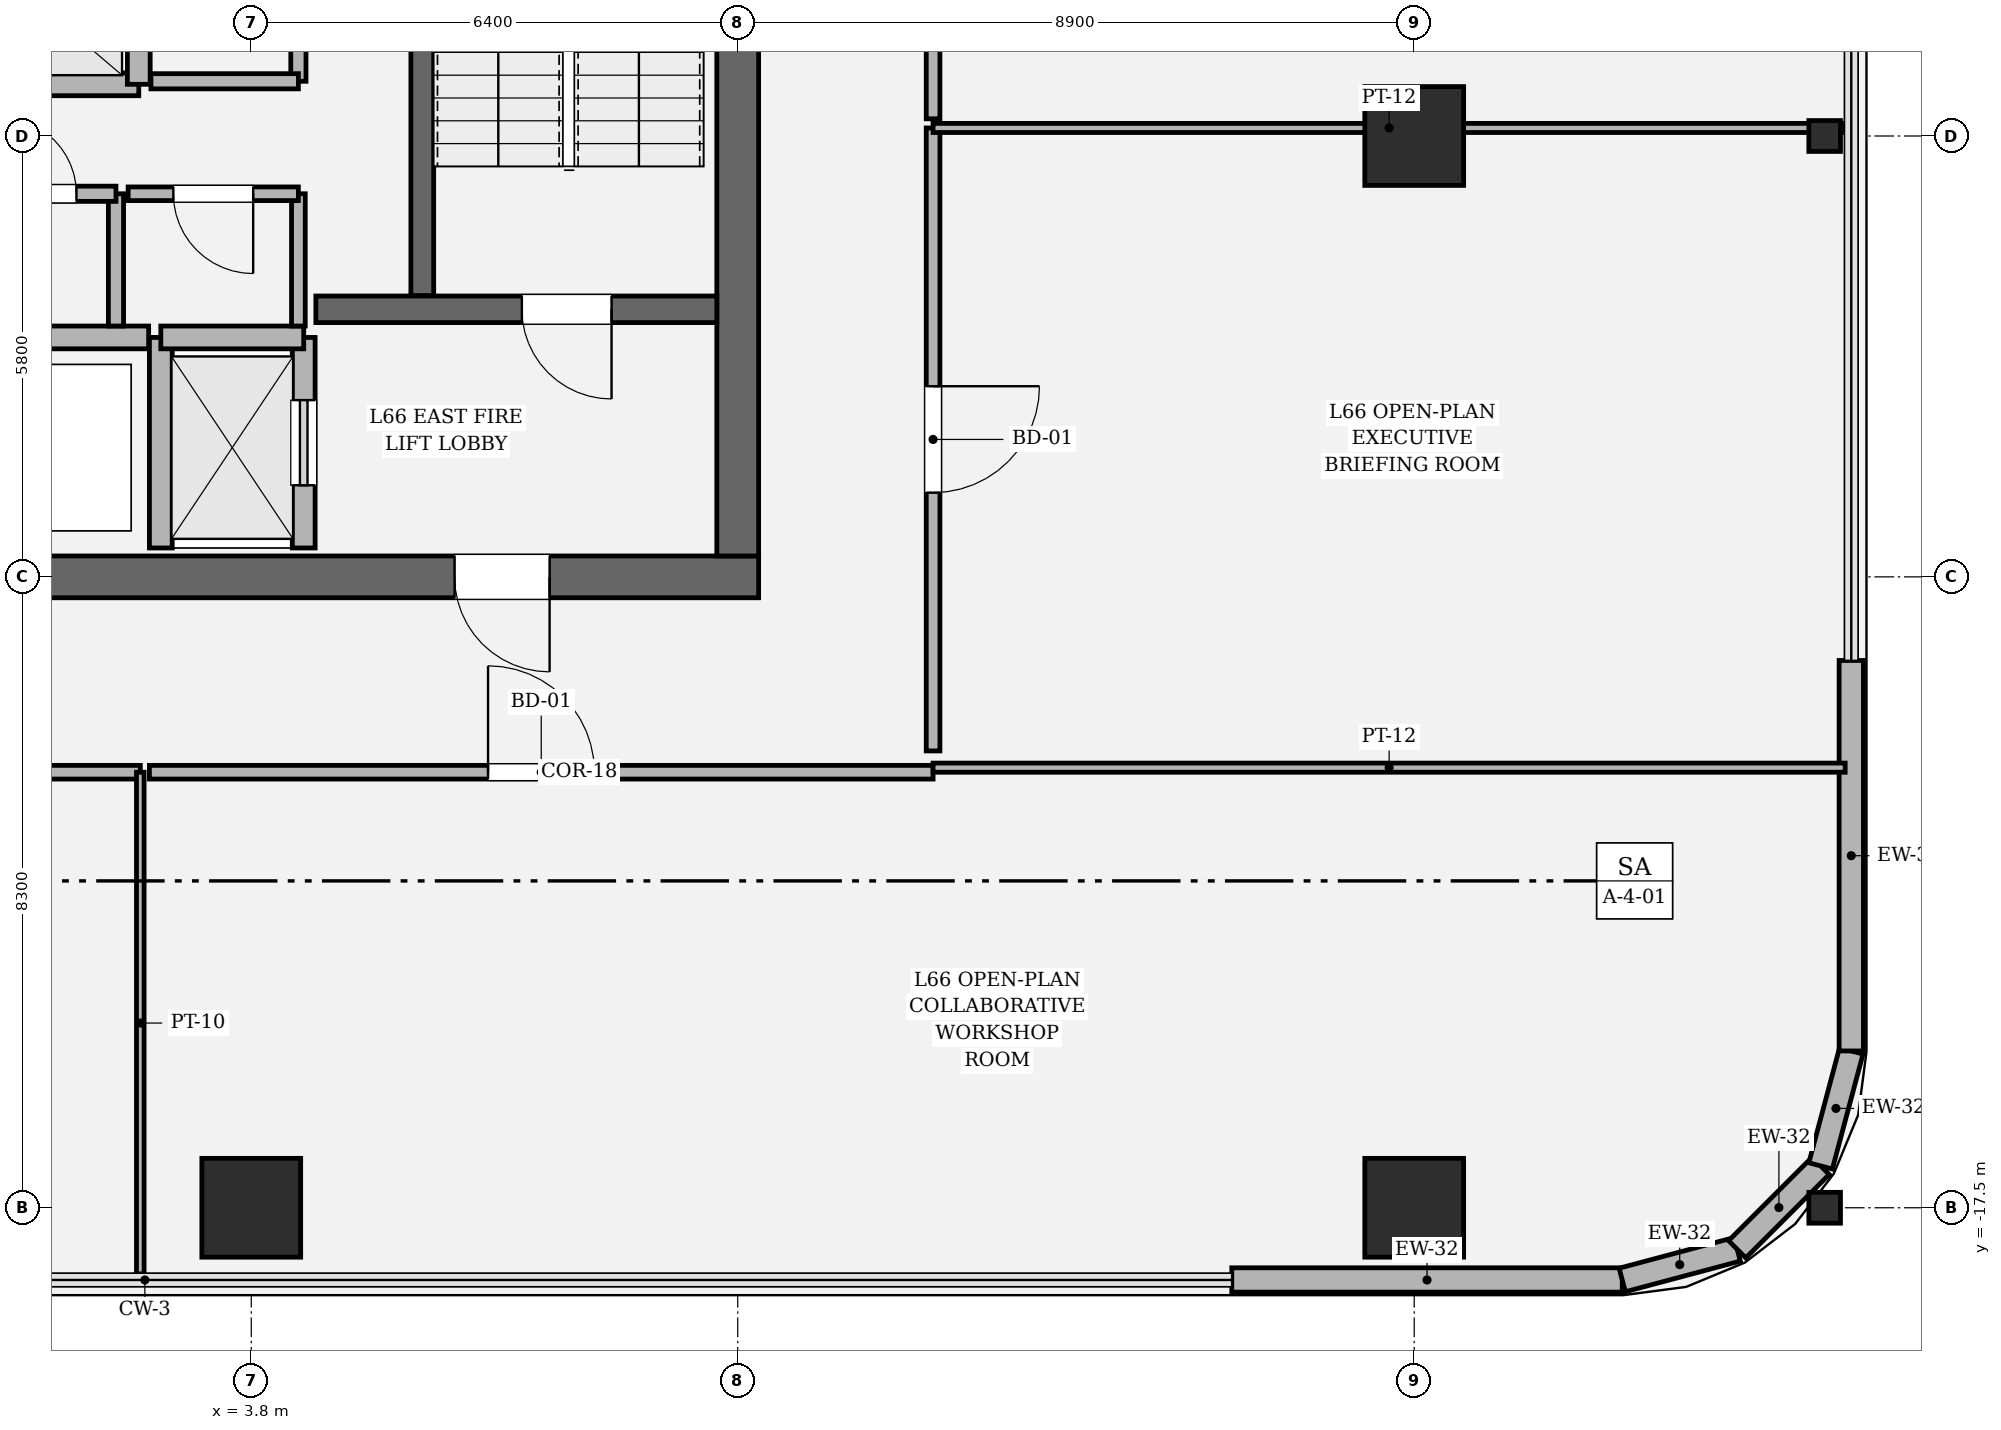
"""IFC4 building model, lengths in metres.
Left out: names, types, materials, properties, quantities, classifications, styles, units other than length and angle.
Written with IfcOpenShell. Run it as: python <this file> out.ifc"""

import sys

from ifc_helpers import new_model, si_unit, direction, frame, frame_2d, origin, origin_2d, place, context, subcontext, project, spatial, rectangle, hollow_rectangle, i_section, extrude, element, fill, save


model = new_model("IFC4")
c1 = context("Model", 3, precision=1e-05, world=origin(), true_north=direction((0.0, 1.0)))
c2 = subcontext(c1, "Body", "Model", "MODEL_VIEW")
j1 = project(units=[si_unit("LENGTHUNIT", "METRE"), si_unit("PLANEANGLEUNIT", "RADIAN")], contexts=[c1])
p1 = place(None, origin())
s1 = spatial("IfcSite", under=j1, at=p1, CompositionType="ELEMENT")
p2 = place(p1, origin())
s2 = spatial("IfcBuilding", under=s1, at=p2, CompositionType="ELEMENT")
p3 = place(p2, frame((0.0, 0.0, 279.75)))
s3 = spatial("IfcBuildingStorey", under=s2, at=p3, CompositionType="ELEMENT", Elevation=279.75)
p4 = place(p3, frame((10.475, -9.2, 0.0), z_axis=(0.0, 0.0, 1.0), x_axis=(-1.0, 0.0, 0.0)))
e1 = element("IfcWall", 1, at=p4, inside=s3, PredefinedType="SHEAR", context=c2, shape_type="SweptSolid", body=[
    extrude(rectangle(XDim=20.95, YDim=0.55, at=frame_2d((10.475, 0.0))), origin(), (0.0, 0.0, 1.0), 4.05),
])
p5 = place(p4, frame((2.75, 0.0, 0.0)))
e2 = element("IfcOpeningElement", 2, at=p5, cuts=e1, PredefinedType="OPENING", context=c2, shape_type="SweptSolid", body=[
    extrude(rectangle(XDim=1.25, YDim=2.25, at=frame_2d((0.625, 1.125))), frame((0.0, 0.285, 0.0), z_axis=(0.0, -1.0, 0.0), x_axis=(1.0, 0.0, 0.0)), (0.0, 0.0, 1.0), 0.57),
])
p6 = place(p4, frame((16.95, 0.0, 0.0)))
e3 = element("IfcOpeningElement", 3, at=p6, cuts=e1, PredefinedType="OPENING", context=c2, shape_type="SweptSolid", body=[
    extrude(rectangle(XDim=1.25, YDim=2.25, at=frame_2d((0.625, 1.125))), frame((0.0, 0.285, 0.0), z_axis=(0.0, -1.0, 0.0), x_axis=(1.0, 0.0, 0.0)), (0.0, 0.0, 1.0), 0.57),
])
p7 = place(p3, frame((10.2, 8.925, 0.0), z_axis=(0.0, 0.0, 1.0), x_axis=(0.0, -1.0, 0.0)))
e4 = element("IfcWall", 4, at=p7, inside=s3, PredefinedType="SHEAR", context=c2, shape_type="SweptSolid", body=[
    extrude(rectangle(XDim=17.85, YDim=0.55, at=frame_2d((8.925, 0.0))), origin(), (0.0, 0.0, 1.0), 4.05),
])
p8 = place(p7, frame((3.955, 0.0, 0.0)))
e5 = element("IfcOpeningElement", 5, at=p8, cuts=e4, PredefinedType="OPENING", context=c2, shape_type="SweptSolid", body=[
    extrude(rectangle(XDim=1.18, YDim=2.2, at=frame_2d((0.59, 1.1))), frame((0.0, 0.285, 0.0), z_axis=(0.0, -1.0, 0.0), x_axis=(1.0, 0.0, 0.0)), (0.0, 0.0, 1.0), 0.57),
])
p9 = place(p3, frame((6.05, 3.45, 0.0), z_axis=(0.0, 0.0, 1.0), x_axis=(0.0, -1.0, 0.0)))
e6 = element("IfcWall", 6, at=p9, inside=s3, PredefinedType="SOLIDWALL", context=c2, shape_type="SweptSolid", body=[
    extrude(rectangle(XDim=8.95, YDim=0.3, at=frame_2d((4.475, 0.0))), origin(), (0.0, 0.0, 1.0), 4.05),
])
p10 = place(p3, frame((4.65, -5.68, 0.0), z_axis=(0.0, 0.0, 1.0), x_axis=(1.0, 0.0, 0.0)))
e7 = element("IfcWall", 7, at=p10, inside=s3, PredefinedType="SOLIDWALL", context=c2, shape_type="SweptSolid", body=[
    extrude(rectangle(XDim=5.275, YDim=0.35, at=frame_2d((2.638, 0.0))), origin(), (0.0, 0.0, 1.0), 4.05),
])
p11 = place(p10, frame((2.71, 0.0, 0.0)))
e8 = element("IfcOpeningElement", 8, at=p11, cuts=e7, PredefinedType="OPENING", context=c2, shape_type="SweptSolid", body=[
    extrude(rectangle(XDim=1.18, YDim=2.2, at=frame_2d((0.59, 1.1))), frame((0.0, 0.185, 0.0), z_axis=(0.0, -1.0, 0.0), x_axis=(1.0, 0.0, 0.0)), (0.0, 0.0, 1.0), 0.37),
])
for number, where, z_axis, x_axis in (
    (9, (3.8, -17.5, 0.0), (0.0, 0.0, 1.0), (1.0, 0.0, 0.0)),
    (10, (19.1, -17.5, 0.0), (0.0, 0.0, 1.0), (1.0, 0.0, 0.0)),
    (11, (19.1, -3.4, 0.0), (0.0, 0.0, 1.0), (1.0, 0.0, 0.0)),
):
    element("IfcColumn", number, at=place(p3, frame(where, z_axis=z_axis, x_axis=x_axis)), inside=s3, PredefinedType="COLUMN", context=c2, shape_type="SweptSolid", body=[
        extrude(hollow_rectangle(XDim=1.3, YDim=1.3, WallThickness=0.038, at=origin_2d()), origin(), (0.0, 0.0, 1.0), 4.05),
    ])
for number, where, z_axis, x_axis in (
    (12, (24.5, -17.5, 0.0), (0.0, 0.0, 1.0), (0.0, 1.0, 0.0)),
    (13, (24.5, -3.4, 0.0), (0.0, 0.0, 1.0), (0.0, 1.0, 0.0)),
):
    element("IfcColumn", number, at=place(p3, frame(where, z_axis=z_axis, x_axis=x_axis)), inside=s3, PredefinedType="COLUMN", context=c2, shape_type="SweptSolid", body=[
        extrude(i_section(OverallWidth=0.406, OverallDepth=0.416, WebThickness=0.029, FlangeThickness=0.048, FilletRadius=0.018, at=origin_2d()), origin(), (0.0, 0.0, 1.0), 4.048),
    ])
p12 = place(p3, frame((16.7, -18.45, 0.0), z_axis=(0.0, 0.0, 1.0), x_axis=(1.0, 0.0, 0.0)))
e14 = element("IfcWall", 14, at=p12, inside=s3, PredefinedType="SOLIDWALL", context=c2, shape_type="SweptSolid", body=[
    extrude(rectangle(XDim=5.137, YDim=0.32, at=frame_2d((2.568, 0.0))), origin(), (0.0, 0.0, 1.0), 3.77),
])
p13 = place(p3, frame((21.837, -18.45, 0.0), z_axis=(0.0, 0.0, 1.0), x_axis=(0.966224582397, 0.257701486942, 0.0)))
e15 = element("IfcWall", 15, at=p13, inside=s3, PredefinedType="SOLIDWALL", context=c2, shape_type="SweptSolid", body=[
    extrude(rectangle(XDim=1.565, YDim=0.32, at=frame_2d((0.783, 0.0))), origin(), (0.0, 0.0, 1.0), 3.77),
])
p14 = place(p3, frame((23.349, -18.047, 0.0), z_axis=(0.0, 0.0, 1.0), x_axis=(0.707106781187, 0.707106781187, 0.0)))
e16 = element("IfcWall", 16, at=p14, inside=s3, PredefinedType="SOLIDWALL", context=c2, shape_type="SweptSolid", body=[
    extrude(rectangle(XDim=1.552, YDim=0.32, at=frame_2d((0.776, 0.0))), origin(), (0.0, 0.0, 1.0), 3.77),
])
p15 = place(p3, frame((24.447, -16.949, 0.0), z_axis=(0.0, 0.0, 1.0), x_axis=(0.257847112249, 0.966185730957, 0.0)))
e17 = element("IfcWall", 17, at=p15, inside=s3, PredefinedType="SOLIDWALL", context=c2, shape_type="SweptSolid", body=[
    extrude(rectangle(XDim=1.565, YDim=0.32, at=frame_2d((0.783, 0.0))), origin(), (0.0, 0.0, 1.0), 3.77),
])
p16 = place(p3, frame((24.85, -15.437, 0.0), z_axis=(0.0, 0.0, 1.0), x_axis=(0.0, 1.0, 0.0)))
e18 = element("IfcWall", 18, at=p16, inside=s3, PredefinedType="SOLIDWALL", context=c2, shape_type="SweptSolid", body=[
    extrude(rectangle(XDim=5.137, YDim=0.32, at=frame_2d((2.568, 0.0))), origin(), (0.0, 0.0, 1.0), 3.77),
])
p17 = place(p3, frame((4.49, -8.82, 0.0), z_axis=(0.0, 0.0, 1.0), x_axis=(0.0, 1.0, 0.0)))
e19 = element("IfcWall", 19, at=p17, inside=s3, PredefinedType="SOLIDWALL", context=c2, shape_type="SweptSolid", body=[
    extrude(rectangle(XDim=2.77, YDim=0.3, at=frame_2d((1.385, 0.0))), origin(), (0.0, 0.0, 1.0), 3.77),
])
p18 = place(p17, frame((0.825, 0.0, 0.0)))
e20 = element("IfcOpeningElement", 20, at=p18, cuts=e19, PredefinedType="OPENING", context=c2, shape_type="SweptSolid", body=[
    extrude(rectangle(XDim=1.12, YDim=2.25, at=frame_2d((0.56, 1.125))), frame((0.0, 0.16, 0.0), z_axis=(0.0, -1.0, 0.0), x_axis=(1.0, 0.0, 0.0)), (0.0, 0.0, 1.0), 0.32),
])
p19 = place(p3, frame((2.61, -8.82, 0.0), z_axis=(0.0, 0.0, 1.0), x_axis=(0.0, 1.0, 0.0)))
e21 = element("IfcWall", 21, at=p19, inside=s3, PredefinedType="SOLIDWALL", context=c2, shape_type="SweptSolid", body=[
    extrude(rectangle(XDim=2.77, YDim=0.3, at=frame_2d((1.385, 0.0))), origin(), (0.0, 0.0, 1.0), 3.77),
])
p20 = place(p3, frame((2.61, -6.05, 0.0), z_axis=(0.0, 0.0, 1.0), x_axis=(1.0, 0.0, 0.0)))
e22 = element("IfcWall", 22, at=p20, inside=s3, PredefinedType="SOLIDWALL", context=c2, shape_type="SweptSolid", body=[
    extrude(rectangle(XDim=1.88, YDim=0.3, at=frame_2d((0.94, 0.0))), origin(), (0.0, 0.0, 1.0), 3.77),
])
p21 = place(p3, frame((-4.52, -2.72, 0.0), z_axis=(0.0, 0.0, 1.0), x_axis=(1.0, 0.0, 0.0)))
e23 = element("IfcWall", 23, at=p21, inside=s3, PredefinedType="SOLIDWALL", context=c2, shape_type="SweptSolid", body=[
    extrude(rectangle(XDim=6.84, YDim=0.3, at=frame_2d((3.42, 0.0))), origin(), (0.0, 0.0, 1.0), 3.77),
])
p22 = place(p3, frame((2.32, -2.72, 0.0), z_axis=(0.0, 0.0, 1.0), x_axis=(0.0, 1.0, 0.0)))
e24 = element("IfcWall", 24, at=p22, inside=s3, PredefinedType="SOLIDWALL", context=c2, shape_type="SweptSolid", body=[
    extrude(rectangle(XDim=1.88, YDim=0.3, at=frame_2d((0.94, 0.0))), origin(), (0.0, 0.0, 1.0), 3.77),
])
p23 = place(p3, frame((-2.45, -6.05, 0.0), z_axis=(0.0, 0.0, 1.0), x_axis=(1.0, 0.0, 0.0)))
e25 = element("IfcWall", 25, at=p23, inside=s3, PredefinedType="SOLIDWALL", context=c2, shape_type="SweptSolid", body=[
    extrude(rectangle(XDim=4.9, YDim=0.3, at=frame_2d((2.45, 0.0))), origin(), (0.0, 0.0, 1.0), 3.77),
])
p24 = place(p3, frame((2.02, -5.9, 0.0), z_axis=(0.0, 0.0, 1.0), x_axis=(0.0, 1.0, 0.0)))
e26 = element("IfcWall", 26, at=p24, inside=s3, PredefinedType="SOLIDWALL", context=c2, shape_type="SweptSolid", body=[
    extrude(rectangle(XDim=1.74, YDim=0.2, at=frame_2d((0.87, 0.0))), origin(), (0.0, 0.0, 1.0), 3.77),
])
p25 = place(p3, frame((2.02, -4.16, 0.0), z_axis=(0.0, 0.0, 1.0), x_axis=(-1.0, 0.0, 0.0)))
e27 = element("IfcWall", 27, at=p25, inside=s3, PredefinedType="SOLIDWALL", context=c2, shape_type="SweptSolid", body=[
    extrude(rectangle(XDim=2.04, YDim=0.2, at=frame_2d((1.02, 0.0))), origin(), (0.0, 0.0, 1.0), 3.77),
])
p26 = place(p25, frame((0.52, 0.0, 0.0)))
e28 = element("IfcOpeningElement", 28, at=p26, cuts=e27, PredefinedType="OPENING", context=c2, shape_type="SweptSolid", body=[
    extrude(rectangle(XDim=1.0, YDim=2.15, at=frame_2d((0.5, 1.075))), frame((0.0, 0.11, 0.0), z_axis=(0.0, -1.0, 0.0), x_axis=(1.0, 0.0, 0.0)), (0.0, 0.0, 1.0), 0.22),
])
p27 = place(p3, frame((4.42, -5.9, 0.0), z_axis=(0.0, 0.0, 1.0), x_axis=(0.0, 1.0, 0.0)))
e29 = element("IfcWall", 29, at=p27, inside=s3, PredefinedType="PARTITIONING", context=c2, shape_type="SweptSolid", body=[
    extrude(rectangle(XDim=1.74, YDim=0.18, at=frame_2d((0.87, 0.0))), origin(), (0.0, 0.0, 1.0), 3.77),
])
p28 = place(p3, frame((4.42, -4.16, 0.0), z_axis=(0.0, 0.0, 1.0), x_axis=(-1.0, 0.0, 0.0)))
e30 = element("IfcWall", 30, at=p28, inside=s3, PredefinedType="PARTITIONING", context=c2, shape_type="SweptSolid", body=[
    extrude(rectangle(XDim=2.24, YDim=0.18, at=frame_2d((1.12, 0.0))), origin(), (0.0, 0.0, 1.0), 3.77),
])
p29 = place(p28, frame((0.595, 0.0, 0.0)))
e31 = element("IfcOpeningElement", 31, at=p29, cuts=e30, PredefinedType="OPENING", context=c2, shape_type="SweptSolid", body=[
    extrude(rectangle(XDim=1.05, YDim=2.2, at=frame_2d((0.525, 1.1))), frame((0.0, 0.1, 0.0), z_axis=(0.0, -1.0, 0.0), x_axis=(1.0, 0.0, 0.0)), (0.0, 0.0, 1.0), 0.2),
])
p30 = place(p3, frame((4.42, -2.68, 0.0), z_axis=(0.0, 0.0, 1.0), x_axis=(0.0, 1.0, 0.0)))
e32 = element("IfcWall", 32, at=p30, inside=s3, PredefinedType="SOLIDWALL", context=c2, shape_type="SweptSolid", body=[
    extrude(rectangle(XDim=1.76, YDim=0.2, at=frame_2d((0.88, 0.0))), origin(), (0.0, 0.0, 1.0), 3.77),
])
p31 = place(p30, frame((0.42, 0.0, 0.0)))
e33 = element("IfcOpeningElement", 33, at=p31, cuts=e32, PredefinedType="OPENING", context=c2, shape_type="SweptSolid", body=[
    extrude(rectangle(XDim=0.92, YDim=2.1, at=frame_2d((0.46, 1.05))), frame((0.0, 0.11, 0.0), z_axis=(0.0, -1.0, 0.0), x_axis=(1.0, 0.0, 0.0)), (0.0, 0.0, 1.0), 0.22),
])
p32 = place(p3, frame((2.48, -2.68, 0.0), z_axis=(0.0, 0.0, 1.0), x_axis=(1.0, 0.0, 0.0)))
e34 = element("IfcWall", 34, at=p32, inside=s3, PredefinedType="SOLIDWALL", context=c2, shape_type="SweptSolid", body=[
    extrude(rectangle(XDim=1.94, YDim=0.2, at=frame_2d((0.97, 0.0))), origin(), (0.0, 0.0, 1.0), 3.77),
])
p33 = place(p3, frame((-7.4, -11.77, 0.0), z_axis=(0.0, 0.0, 1.0), x_axis=(1.0, 0.0, 0.0)))
e35 = element("IfcWall", 35, at=p33, inside=s3, PredefinedType="PARTITIONING", context=c2, shape_type="SweptSolid", body=[
    extrude(rectangle(XDim=9.74, YDim=0.18, at=frame_2d((4.87, 0.0))), origin(), (0.0, 0.0, 1.0), 2.444),
])
p34 = place(p3, frame((2.34, -11.77, 0.0), z_axis=(0.0, 0.0, 1.0), x_axis=(0.0, -1.0, 0.0)))
e36 = element("IfcWall", 36, at=p34, inside=s3, PredefinedType="PARTITIONING", context=c2, shape_type="SweptSolid", body=[
    extrude(rectangle(XDim=6.6, YDim=0.1, at=frame_2d((3.3, 0.0))), origin(), (0.0, 0.0, 1.0), 2.444),
])
p35 = place(p3, frame((2.46, -11.77, 0.0), z_axis=(0.0, 0.0, 1.0), x_axis=(1.0, 0.0, 0.0)))
e37 = element("IfcWall", 37, at=p35, inside=s3, PredefinedType="PARTITIONING", context=c2, shape_type="SweptSolid", body=[
    extrude(rectangle(XDim=10.31, YDim=0.18, at=frame_2d((5.155, 0.0))), origin(), (0.0, 0.0, 1.0), 2.444),
])
p36 = place(p35, frame((4.455, 0.0, 0.0)))
e38 = element("IfcOpeningElement", 38, at=p36, cuts=e37, PredefinedType="OPENING", context=c2, shape_type="SweptSolid", body=[
    extrude(rectangle(XDim=1.4, YDim=2.25, at=frame_2d((0.7, 1.125))), frame((0.0, 0.1, 0.0), z_axis=(0.0, -1.0, 0.0), x_axis=(1.0, 0.0, 0.0)), (0.0, 0.0, 1.0), 0.2),
])
p37 = place(p3, frame((12.77, -11.71, 0.0), z_axis=(0.0, 0.0, 1.0), x_axis=(1.0, 0.0, 0.0)))
e39 = element("IfcWall", 39, at=p37, inside=s3, PredefinedType="PARTITIONING", context=c2, shape_type="SweptSolid", body=[
    extrude(rectangle(XDim=12.0, YDim=0.12, at=frame_2d((6.0, 0.0))), origin(), (0.0, 0.0, 1.0), 2.444),
])
p38 = place(p3, frame((12.77, -11.49, 0.0), z_axis=(0.0, 0.0, 1.0), x_axis=(0.0, 1.0, 0.0)))
e40 = element("IfcWall", 40, at=p38, inside=s3, PredefinedType="PARTITIONING", context=c2, shape_type="SweptSolid", body=[
    extrude(rectangle(XDim=8.196, YDim=0.18, at=frame_2d((4.098, 0.0))), origin(), (0.0, 0.0, 1.0), 2.444),
])
p39 = place(p38, frame((3.398, 0.0, 0.0)))
e41 = element("IfcOpeningElement", 41, at=p39, cuts=e40, PredefinedType="OPENING", context=c2, shape_type="SweptSolid", body=[
    extrude(rectangle(XDim=1.4, YDim=2.25, at=frame_2d((0.7, 1.125))), frame((0.0, 0.1, 0.0), z_axis=(0.0, -1.0, 0.0), x_axis=(1.0, 0.0, 0.0)), (0.0, 0.0, 1.0), 0.2),
])
p40 = place(p3, frame((12.77, -3.294, 0.0), z_axis=(0.0, 0.0, 1.0), x_axis=(1.0, 0.0, 0.0)))
e42 = element("IfcWall", 42, at=p40, inside=s3, PredefinedType="PARTITIONING", context=c2, shape_type="SweptSolid", body=[
    extrude(rectangle(XDim=12.0, YDim=0.12, at=frame_2d((6.0, 0.0))), origin(), (0.0, 0.0, 1.0), 2.444),
])
p41 = place(p3, frame((12.77, -3.174, 0.0), z_axis=(0.0, 0.0, 1.0), x_axis=(0.0, 1.0, 0.0)))
e43 = element("IfcWall", 43, at=p41, inside=s3, PredefinedType="PARTITIONING", context=c2, shape_type="SweptSolid", body=[
    extrude(rectangle(XDim=14.664, YDim=0.18, at=frame_2d((7.332, 0.0))), origin(), (0.0, 0.0, 1.0), 2.444),
])
p42 = place(p41, frame((6.807, 0.0, 0.0)))
e44 = element("IfcOpeningElement", 44, at=p42, cuts=e43, PredefinedType="OPENING", context=c2, shape_type="SweptSolid", body=[
    extrude(rectangle(XDim=1.05, YDim=2.2, at=frame_2d((0.525, 1.1))), frame((0.0, 0.1, 0.0), z_axis=(0.0, -1.0, 0.0), x_axis=(1.0, 0.0, 0.0)), (0.0, 0.0, 1.0), 0.2),
])
p43 = place(p11, origin())
e45 = element("IfcDoor", 45, at=p43, inside=s3, OperationType="SINGLE_SWING_RIGHT", PredefinedType="DOOR", context=c2, shape_type="SweptSolid", body=[
    extrude(rectangle(XDim=1.18, YDim=2.2, at=frame_2d((0.59, 1.1))), frame((0.0, 0.025, 0.0), z_axis=(0.0, -1.0, 0.0), x_axis=(1.0, 0.0, 0.0)), (0.0, 0.0, 1.0), 0.05),
])
fill(e8, e45)
p44 = place(p5, origin())
e46 = element("IfcDoor", 46, at=p44, inside=s3, OperationType="SINGLE_SWING_LEFT", PredefinedType="DOOR", context=c2, shape_type="SweptSolid", body=[
    extrude(rectangle(XDim=1.25, YDim=2.25, at=frame_2d((0.625, 1.125))), frame((0.0, 0.025, 0.0), z_axis=(0.0, -1.0, 0.0), x_axis=(1.0, 0.0, 0.0)), (0.0, 0.0, 1.0), 0.05),
])
fill(e2, e46)
p45 = place(p18, origin())
e47 = element("IfcDoor", 47, at=p45, inside=s3, OperationType="SLIDING_TO_RIGHT", PredefinedType="DOOR", context=c2, shape_type="SweptSolid", body=[
    extrude(rectangle(XDim=1.12, YDim=2.25, at=frame_2d((0.56, 1.125))), frame((0.0, 0.025, 0.0), z_axis=(0.0, -1.0, 0.0), x_axis=(1.0, 0.0, 0.0)), (0.0, 0.0, 1.0), 0.05),
])
fill(e20, e47)
p46 = place(p26, origin())
e48 = element("IfcDoor", 48, at=p46, inside=s3, OperationType="SINGLE_SWING_RIGHT", PredefinedType="DOOR", context=c2, shape_type="SweptSolid", body=[
    extrude(rectangle(XDim=1.0, YDim=2.15, at=frame_2d((0.5, 1.075))), frame((0.0, 0.025, 0.0), z_axis=(0.0, -1.0, 0.0), x_axis=(1.0, 0.0, 0.0)), (0.0, 0.0, 1.0), 0.05),
])
fill(e28, e48)
p47 = place(p29, origin())
e49 = element("IfcDoor", 49, at=p47, inside=s3, OperationType="SINGLE_SWING_LEFT", PredefinedType="DOOR", context=c2, shape_type="SweptSolid", body=[
    extrude(rectangle(XDim=1.05, YDim=2.2, at=frame_2d((0.525, 1.1))), frame((0.0, 0.025, 0.0), z_axis=(0.0, -1.0, 0.0), x_axis=(1.0, 0.0, 0.0)), (0.0, 0.0, 1.0), 0.05),
])
fill(e31, e49)
p48 = place(p36, origin())
e50 = element("IfcDoor", 50, at=p48, inside=s3, OperationType="SINGLE_SWING_LEFT", PredefinedType="DOOR", context=c2, shape_type="SweptSolid", body=[
    extrude(rectangle(XDim=1.4, YDim=2.25, at=frame_2d((0.7, 1.125))), frame((0.0, 0.025, 0.0), z_axis=(0.0, -1.0, 0.0), x_axis=(1.0, 0.0, 0.0)), (0.0, 0.0, 1.0), 0.05),
])
fill(e38, e50)
p49 = place(p39, origin())
e51 = element("IfcDoor", 51, at=p49, inside=s3, OperationType="SINGLE_SWING_RIGHT", PredefinedType="DOOR", context=c2, shape_type="SweptSolid", body=[
    extrude(rectangle(XDim=1.4, YDim=2.25, at=frame_2d((0.7, 1.125))), frame((0.0, 0.025, 0.0), z_axis=(0.0, -1.0, 0.0), x_axis=(1.0, 0.0, 0.0)), (0.0, 0.0, 1.0), 0.05),
])
fill(e41, e51)
save(model, sys.argv[1])
